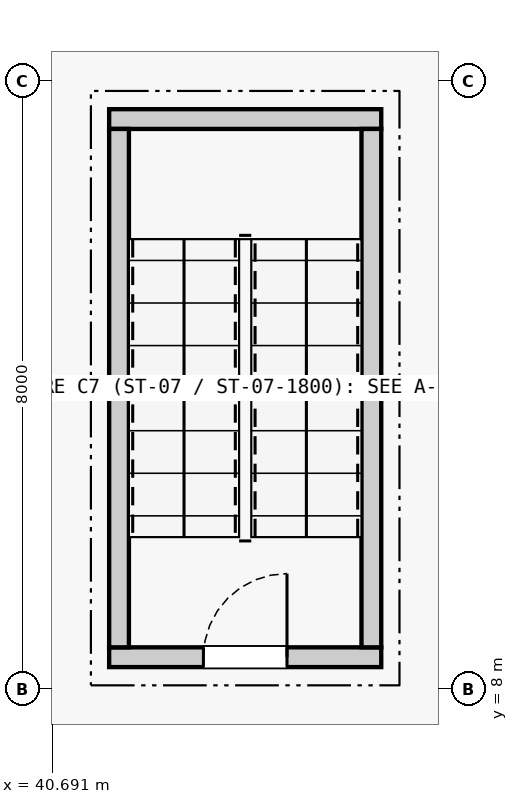
"""IFC4 building model, lengths in metres.
Left out: names, types, materials, properties, quantities, classifications, styles, units other than length and angle.
Written with IfcOpenShell. Run it as: python <this file> out.ifc"""

import sys

from ifc_helpers import new_model, si_unit, direction, frame, frame_2d, origin, place, context, subcontext, project, spatial, rectangle, extrude, element, fill, save


model = new_model("IFC4")
c1 = context("Model", 3, precision=1e-05, world=origin(), true_north=direction((0.0, 1.0)))
c2 = subcontext(c1, "Body", "Model", "MODEL_VIEW")
j1 = project(units=[si_unit("LENGTHUNIT", "METRE"), si_unit("PLANEANGLEUNIT", "RADIAN")], contexts=[c1])
p1 = place(None, origin())
s1 = spatial("IfcSite", under=j1, at=p1, CompositionType="ELEMENT")
p2 = place(p1, origin())
s2 = spatial("IfcBuilding", under=s1, at=p2, CompositionType="ELEMENT")
p3 = place(p2, frame((0.0, 0.0, -5.4)))
s3 = spatial("IfcBuildingStorey", under=s2, at=p3, CompositionType="ELEMENT", Elevation=-5.4)
p4 = place(p3, frame((41.44, 8.42, 0.0), z_axis=(0.0, 0.0, 1.0), x_axis=(1.0, 0.0, 0.0)))
e1 = element("IfcWall", 1, at=p4, inside=s3, PredefinedType="SOLIDWALL", context=c2, shape_type="SweptSolid", body=[
    extrude(rectangle(XDim=3.58, YDim=0.26, at=frame_2d((1.79, 0.0))), origin(), (0.0, 0.0, 1.0), 5.4),
])
p5 = place(p4, frame((1.24, 0.0, 0.0)))
e2 = element("IfcOpeningElement", 2, at=p5, cuts=e1, PredefinedType="OPENING", context=c2, shape_type="SweptSolid", body=[
    extrude(rectangle(XDim=1.1, YDim=2.2, at=frame_2d((0.55, 1.1))), frame((0.0, 0.142, 0.0), z_axis=(0.0, -1.0, 0.0), x_axis=(1.0, 0.0, 0.0)), (0.0, 0.0, 1.0), 0.284),
])
p6 = place(p3, frame((41.44, 15.5, 0.0), z_axis=(0.0, 0.0, 1.0), x_axis=(1.0, 0.0, 0.0)))
e3 = element("IfcWall", 3, at=p6, inside=s3, PredefinedType="SOLIDWALL", context=c2, shape_type="SweptSolid", body=[
    extrude(rectangle(XDim=3.58, YDim=0.26, at=frame_2d((1.79, 0.0))), origin(), (0.0, 0.0, 1.0), 5.4),
])
for number, where, z_axis, x_axis in (
    (4, (41.57, 8.55, 0.0), (0.0, 0.0, 1.0), (0.0, 1.0, 0.0)),
    (5, (44.89, 8.55, 0.0), (0.0, 0.0, 1.0), (0.0, 1.0, 0.0)),
):
    element("IfcWall", number, at=place(p3, frame(where, z_axis=z_axis, x_axis=x_axis)), inside=s3, PredefinedType="SOLIDWALL", context=c2, shape_type="SweptSolid", body=[
        extrude(rectangle(XDim=6.82, YDim=0.26, at=frame_2d((3.41, 0.0))), origin(), (0.0, 0.0, 1.0), 5.4),
    ])
p7 = place(p5, origin())
e6 = element("IfcDoor", 6, at=p7, inside=s3, OperationType="SINGLE_SWING_RIGHT", PredefinedType="DOOR", context=c2, shape_type="SweptSolid", body=[
    extrude(rectangle(XDim=1.1, YDim=2.2, at=frame_2d((0.55, 1.1))), frame((0.0, 0.025, 0.0), z_axis=(0.0, -1.0, 0.0), x_axis=(1.0, 0.0, 0.0)), (0.0, 0.0, 1.0), 0.05),
])
fill(e2, e6)
save(model, sys.argv[1])
